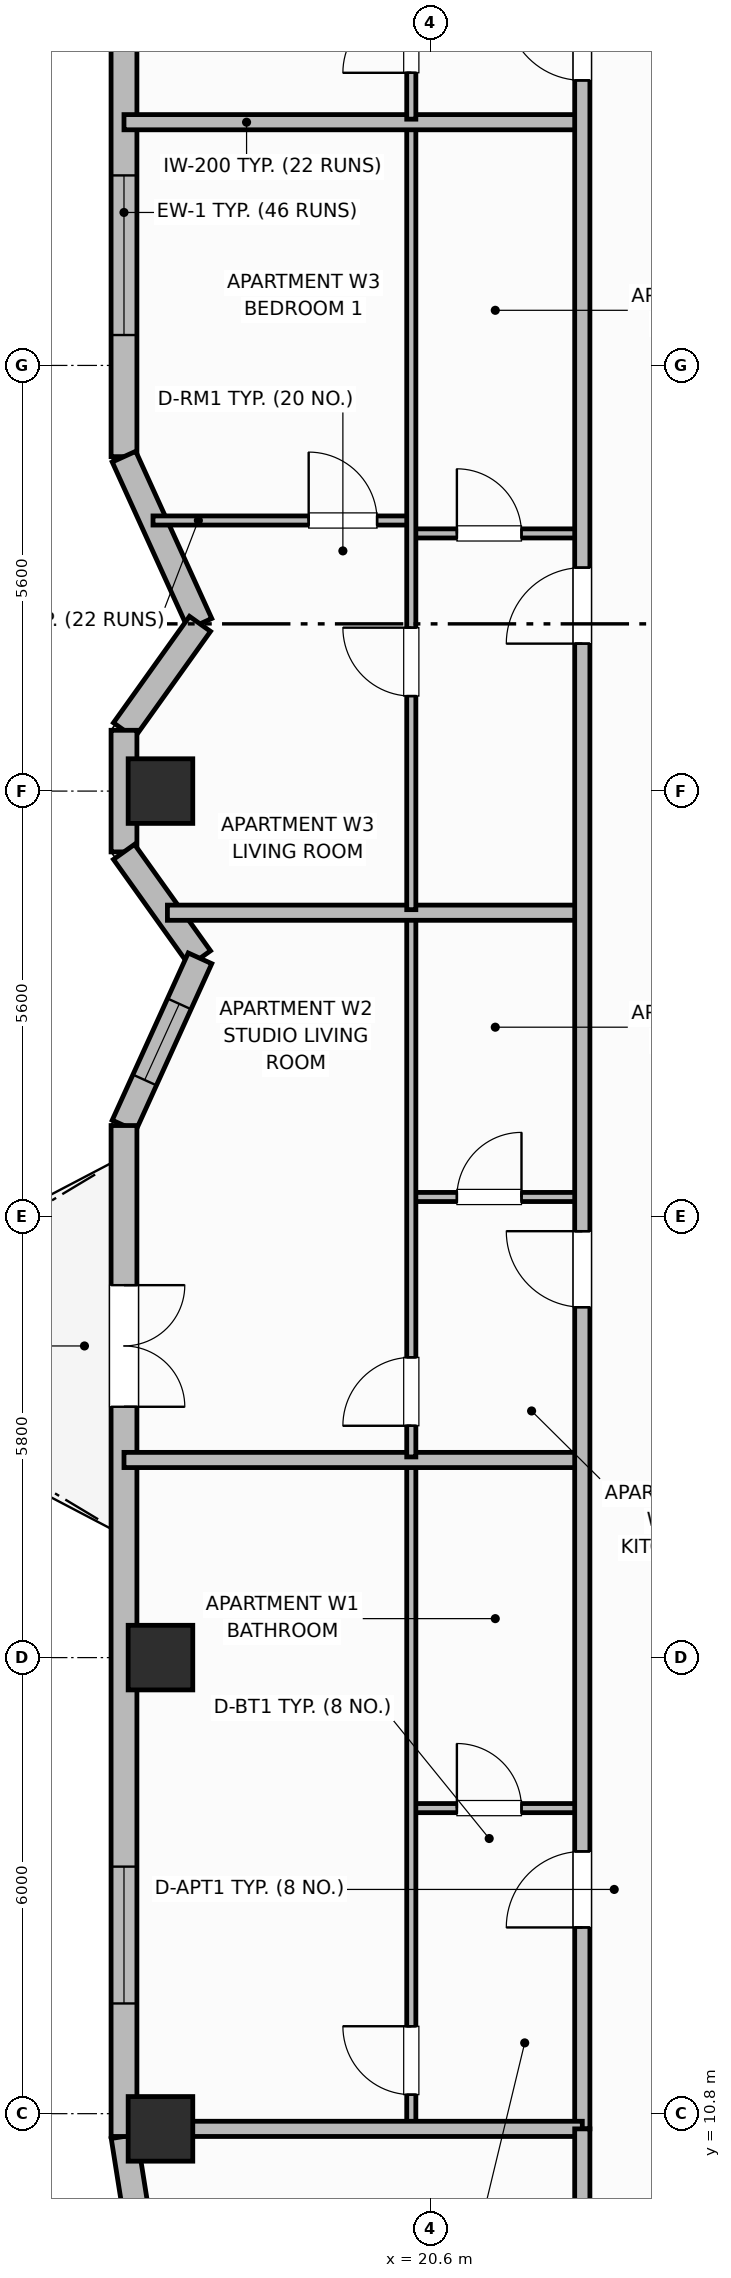
"""IFC4 building model, lengths in metres.
Left out: names, types, materials, properties, quantities, classifications, styles, units other than length and angle.
Written with IfcOpenShell. Run it as: python <this file> out.ifc"""

import sys

from ifc_helpers import new_model, si_unit, direction, frame, frame_2d, origin, origin_2d, place, context, subcontext, project, spatial, rectangle, extrude, element, fill, save


model = new_model("IFC4")
c1 = context("Model", 3, precision=1e-05, world=origin(), true_north=direction((0.0, 1.0)))
c2 = subcontext(c1, "Body", "Model", "MODEL_VIEW")
j1 = project(units=[si_unit("LENGTHUNIT", "METRE"), si_unit("PLANEANGLEUNIT", "RADIAN")], contexts=[c1])
p1 = place(None, origin())
s1 = spatial("IfcSite", under=j1, at=p1, CompositionType="ELEMENT")
p2 = place(p1, origin())
s2 = spatial("IfcBuilding", under=s1, at=p2, CompositionType="ELEMENT")
p3 = place(p2, frame((0.0, 0.0, 222.1)))
s3 = spatial("IfcBuildingStorey", under=s2, at=p3, CompositionType="ELEMENT", Elevation=222.1)
for number, where, z_axis, x_axis in (
    (1, (17.05, 10.6, 0.0), (0.0, 0.0, 1.0), (1.0, 0.0, 0.0)),
    (2, (17.05, 16.8, 0.0), (0.0, 0.0, 1.0), (1.0, 0.0, 0.0)),
    (3, (17.05, 28.2, 0.0), (0.0, 0.0, 1.0), (1.0, 0.0, 0.0)),
):
    element("IfcColumn", number, at=place(p3, frame(where, z_axis=z_axis, x_axis=x_axis)), inside=s3, PredefinedType="COLUMN", context=c2, shape_type="SweptSolid", body=[
        extrude(rectangle(XDim=0.85, YDim=0.85, at=origin_2d()), origin(), (0.0, 0.0, 1.0), 3.7),
    ])
p4 = place(p3, frame((16.57, 10.5, 0.0), z_axis=(0.0, 0.0, 1.0), x_axis=(0.156514556949, -0.987675651954, 0.0)))
e4 = element("IfcWall", 4, at=p4, inside=s3, PredefinedType="SOLIDWALL", context=c2, shape_type="SweptSolid", body=[
    extrude(rectangle(XDim=1.135, YDim=0.34, at=frame_2d((0.568, 0.0))), origin(), (0.0, 0.0, 1.0), 2.26),
])
p5 = place(p3, frame((16.57, 45.9, 0.0), z_axis=(0.0, 0.0, 1.0), x_axis=(0.0, -1.0, 0.0)))
e5 = element("IfcWall", 5, at=p5, inside=s3, PredefinedType="SOLIDWALL", context=c2, shape_type="SweptSolid", body=[
    extrude(rectangle(XDim=13.3, YDim=0.34, at=frame_2d((6.65, 0.0))), origin(), (0.0, 0.0, 1.0), 2.26),
])
p6 = place(p5, frame((1.6, 0.0, 0.3)))
e6 = element("IfcOpeningElement", 6, at=p6, cuts=e5, PredefinedType="OPENING", context=c2, shape_type="SweptSolid", body=[
    extrude(rectangle(XDim=2.1, YDim=1.9, at=frame_2d((1.05, 0.95))), frame((0.0, 0.18, 0.0), z_axis=(0.0, -1.0, 0.0), x_axis=(1.0, 0.0, 0.0)), (0.0, 0.0, 1.0), 0.36),
])
p7 = place(p5, frame((9.6, 0.0, 0.3)))
e7 = element("IfcOpeningElement", 7, at=p7, cuts=e5, PredefinedType="OPENING", context=c2, shape_type="SweptSolid", body=[
    extrude(rectangle(XDim=2.1, YDim=1.9, at=frame_2d((1.05, 0.95))), frame((0.0, 0.18, 0.0), z_axis=(0.0, -1.0, 0.0), x_axis=(1.0, 0.0, 0.0)), (0.0, 0.0, 1.0), 0.36),
])
p8 = place(p3, frame((16.57, 32.6, 0.0), z_axis=(0.0, 0.0, 1.0), x_axis=(0.413772500085, -0.910380315128, 0.0)))
e8 = element("IfcWall", 8, at=p8, inside=s3, PredefinedType="SOLIDWALL", context=c2, shape_type="SweptSolid", body=[
    extrude(rectangle(XDim=2.417, YDim=0.34, at=frame_2d((1.208, 0.0))), origin(), (0.0, 0.0, 1.0), 2.26),
])
p9 = place(p3, frame((17.57, 30.4, 0.0), z_axis=(0.0, 0.0, 1.0), x_axis=(-0.581265041318, -0.813714293681, 0.0)))
e9 = element("IfcWall", 9, at=p9, inside=s3, PredefinedType="SOLIDWALL", context=c2, shape_type="SweptSolid", body=[
    extrude(rectangle(XDim=1.72, YDim=0.34, at=frame_2d((0.86, 0.0))), origin(), (0.0, 0.0, 1.0), 2.26),
])
p10 = place(p3, frame((16.57, 29.0, 0.0), z_axis=(0.0, 0.0, 1.0), x_axis=(0.0, -1.0, 0.0)))
e10 = element("IfcWall", 10, at=p10, inside=s3, PredefinedType="SOLIDWALL", context=c2, shape_type="SweptSolid", body=[
    extrude(rectangle(XDim=1.6, YDim=0.34, at=frame_2d((0.8, 0.0))), origin(), (0.0, 0.0, 1.0), 2.26),
])
p11 = place(p3, frame((16.57, 27.4, 0.0), z_axis=(0.0, 0.0, 1.0), x_axis=(0.581265041318, -0.813714293681, 0.0)))
e11 = element("IfcWall", 11, at=p11, inside=s3, PredefinedType="SOLIDWALL", context=c2, shape_type="SweptSolid", body=[
    extrude(rectangle(XDim=1.72, YDim=0.34, at=frame_2d((0.86, 0.0))), origin(), (0.0, 0.0, 1.0), 2.26),
])
p12 = place(p3, frame((17.57, 26.0, 0.0), z_axis=(0.0, 0.0, 1.0), x_axis=(-0.413810555983, -0.910363017569, 0.0)))
e12 = element("IfcWall", 12, at=p12, inside=s3, PredefinedType="SOLIDWALL", context=c2, shape_type="SweptSolid", body=[
    extrude(rectangle(XDim=2.417, YDim=0.34, at=frame_2d((1.208, 0.0))), origin(), (0.0, 0.0, 1.0), 2.26),
])
p13 = place(p12, frame((0.658, 0.0, 0.45)))
e13 = element("IfcOpeningElement", 13, at=p13, cuts=e12, PredefinedType="OPENING", context=c2, shape_type="SweptSolid", body=[
    extrude(rectangle(XDim=1.1, YDim=1.65, at=frame_2d((0.55, 0.825))), frame((0.0, 0.18, 0.0), z_axis=(0.0, -1.0, 0.0), x_axis=(1.0, 0.0, 0.0)), (0.0, 0.0, 1.0), 0.36),
])
p14 = place(p3, frame((16.57, 23.8, 0.0), z_axis=(0.0, 0.0, 1.0), x_axis=(0.0, -1.0, 0.0)))
e14 = element("IfcWall", 14, at=p14, inside=s3, PredefinedType="SOLIDWALL", context=c2, shape_type="SweptSolid", body=[
    extrude(rectangle(XDim=13.3, YDim=0.34, at=frame_2d((6.65, 0.0))), origin(), (0.0, 0.0, 1.0), 2.26),
])
p15 = place(p14, frame((2.1, 0.0, 0.0)))
e15 = element("IfcOpeningElement", 15, at=p15, cuts=e14, PredefinedType="OPENING", context=c2, shape_type="SweptSolid", body=[
    extrude(rectangle(XDim=1.6, YDim=2.1, at=frame_2d((0.8, 1.05))), frame((0.0, 0.18, 0.0), z_axis=(0.0, -1.0, 0.0), x_axis=(1.0, 0.0, 0.0)), (0.0, 0.0, 1.0), 0.36),
])
p16 = place(p14, frame((9.75, 0.0, 0.3)))
e16 = element("IfcOpeningElement", 16, at=p16, cuts=e14, PredefinedType="OPENING", context=c2, shape_type="SweptSolid", body=[
    extrude(rectangle(XDim=1.8, YDim=1.85, at=frame_2d((0.9, 0.925))), frame((0.0, 0.18, 0.0), z_axis=(0.0, -1.0, 0.0), x_axis=(1.0, 0.0, 0.0)), (0.0, 0.0, 1.0), 0.36),
])
p17 = place(p3, frame((20.35, 14.82, 0.0), z_axis=(0.0, 0.0, 1.0), x_axis=(1.0, 0.0, 0.0)))
e17 = element("IfcWall", 17, at=p17, inside=s3, PredefinedType="PARTITIONING", context=c2, shape_type="SweptSolid", body=[
    extrude(rectangle(XDim=2.25, YDim=0.12, at=frame_2d((1.125, 0.0))), origin(), (0.0, 0.0, 1.0), 2.24),
])
p18 = place(p17, frame((0.6, 0.0, 0.0)))
e18 = element("IfcOpeningElement", 18, at=p18, cuts=e17, PredefinedType="OPENING", context=c2, shape_type="SweptSolid", body=[
    extrude(rectangle(XDim=0.85, YDim=2.1, at=frame_2d((0.425, 1.05))), frame((0.0, 0.07, 0.0), z_axis=(0.0, -1.0, 0.0), x_axis=(1.0, 0.0, 0.0)), (0.0, 0.0, 1.0), 0.14),
])
p19 = place(p3, frame((20.35, 10.64, 0.0), z_axis=(0.0, 0.0, 1.0), x_axis=(0.0, 1.0, 0.0)))
e19 = element("IfcWall", 19, at=p19, inside=s3, PredefinedType="PARTITIONING", context=c2, shape_type="SweptSolid", body=[
    extrude(rectangle(XDim=8.72, YDim=0.12, at=frame_2d((4.36, 0.0))), origin(), (0.0, 0.0, 1.0), 2.24),
])
p20 = place(p19, frame((0.41, 0.0, 0.0)))
e20 = element("IfcOpeningElement", 20, at=p20, cuts=e19, PredefinedType="OPENING", context=c2, shape_type="SweptSolid", body=[
    extrude(rectangle(XDim=0.9, YDim=2.1, at=frame_2d((0.45, 1.05))), frame((0.0, 0.07, 0.0), z_axis=(0.0, -1.0, 0.0), x_axis=(1.0, 0.0, 0.0)), (0.0, 0.0, 1.0), 0.14),
])
p21 = place(p3, frame((16.57, 19.4, 0.0), z_axis=(0.0, 0.0, 1.0), x_axis=(1.0, 0.0, 0.0)))
e21 = element("IfcWall", 21, at=p21, inside=s3, PredefinedType="PARTITIONING", context=c2, shape_type="SweptSolid", body=[
    extrude(rectangle(XDim=6.03, YDim=0.2, at=frame_2d((3.015, 0.0))), origin(), (0.0, 0.0, 1.0), 2.24),
])
p22 = place(p3, frame((20.35, 22.86, 0.0), z_axis=(0.0, 0.0, 1.0), x_axis=(1.0, 0.0, 0.0)))
e22 = element("IfcWall", 22, at=p22, inside=s3, PredefinedType="PARTITIONING", context=c2, shape_type="SweptSolid", body=[
    extrude(rectangle(XDim=2.25, YDim=0.12, at=frame_2d((1.125, 0.0))), origin(), (0.0, 0.0, 1.0), 2.24),
])
p23 = place(p22, frame((0.6, 0.0, 0.0)))
e23 = element("IfcOpeningElement", 23, at=p23, cuts=e22, PredefinedType="OPENING", context=c2, shape_type="SweptSolid", body=[
    extrude(rectangle(XDim=0.85, YDim=2.1, at=frame_2d((0.425, 1.05))), frame((0.0, 0.07, 0.0), z_axis=(0.0, -1.0, 0.0), x_axis=(1.0, 0.0, 0.0)), (0.0, 0.0, 1.0), 0.14),
])
p24 = place(p3, frame((20.35, 19.44, 0.0), z_axis=(0.0, 0.0, 1.0), x_axis=(0.0, 1.0, 0.0)))
e24 = element("IfcWall", 24, at=p24, inside=s3, PredefinedType="PARTITIONING", context=c2, shape_type="SweptSolid", body=[
    extrude(rectangle(XDim=7.12, YDim=0.12, at=frame_2d((3.56, 0.0))), origin(), (0.0, 0.0, 1.0), 2.24),
])
p25 = place(p24, frame((0.41, 0.0, 0.0)))
e25 = element("IfcOpeningElement", 25, at=p25, cuts=e24, PredefinedType="OPENING", context=c2, shape_type="SweptSolid", body=[
    extrude(rectangle(XDim=0.9, YDim=2.1, at=frame_2d((0.45, 1.05))), frame((0.0, 0.07, 0.0), z_axis=(0.0, -1.0, 0.0), x_axis=(1.0, 0.0, 0.0)), (0.0, 0.0, 1.0), 0.14),
])
p26 = place(p3, frame((17.141, 26.6, 0.0), z_axis=(0.0, 0.0, 1.0), x_axis=(1.0, 0.0, 0.0)))
e26 = element("IfcWall", 26, at=p26, inside=s3, PredefinedType="PARTITIONING", context=c2, shape_type="SweptSolid", body=[
    extrude(rectangle(XDim=5.459, YDim=0.2, at=frame_2d((2.729, 0.0))), origin(), (0.0, 0.0, 1.0), 2.24),
])
p27 = place(p3, frame((20.35, 31.59, 0.0), z_axis=(0.0, 0.0, 1.0), x_axis=(1.0, 0.0, 0.0)))
e27 = element("IfcWall", 27, at=p27, inside=s3, PredefinedType="PARTITIONING", context=c2, shape_type="SweptSolid", body=[
    extrude(rectangle(XDim=2.25, YDim=0.12, at=frame_2d((1.125, 0.0))), origin(), (0.0, 0.0, 1.0), 2.24),
])
p28 = place(p27, frame((0.6, 0.0, 0.0)))
e28 = element("IfcOpeningElement", 28, at=p28, cuts=e27, PredefinedType="OPENING", context=c2, shape_type="SweptSolid", body=[
    extrude(rectangle(XDim=0.85, YDim=2.1, at=frame_2d((0.425, 1.05))), frame((0.0, 0.07, 0.0), z_axis=(0.0, -1.0, 0.0), x_axis=(1.0, 0.0, 0.0)), (0.0, 0.0, 1.0), 0.14),
])
p29 = place(p3, frame((16.952, 31.76, 0.0), z_axis=(0.0, 0.0, 1.0), x_axis=(1.0, 0.0, 0.0)))
e29 = element("IfcWall", 29, at=p29, inside=s3, PredefinedType="PARTITIONING", context=c2, shape_type="SweptSolid", body=[
    extrude(rectangle(XDim=3.398, YDim=0.12, at=frame_2d((1.699, 0.0))), origin(), (0.0, 0.0, 1.0), 2.24),
])
p30 = place(p29, frame((2.048, 0.0, 0.0)))
e30 = element("IfcOpeningElement", 30, at=p30, cuts=e29, PredefinedType="OPENING", context=c2, shape_type="SweptSolid", body=[
    extrude(rectangle(XDim=0.9, YDim=2.1, at=frame_2d((0.45, 1.05))), frame((0.0, 0.07, 0.0), z_axis=(0.0, -1.0, 0.0), x_axis=(1.0, 0.0, 0.0)), (0.0, 0.0, 1.0), 0.14),
])
p31 = place(p3, frame((20.35, 26.64, 0.0), z_axis=(0.0, 0.0, 1.0), x_axis=(0.0, 1.0, 0.0)))
e31 = element("IfcWall", 31, at=p31, inside=s3, PredefinedType="PARTITIONING", context=c2, shape_type="SweptSolid", body=[
    extrude(rectangle(XDim=10.32, YDim=0.12, at=frame_2d((5.16, 0.0))), origin(), (0.0, 0.0, 1.0), 2.24),
])
p32 = place(p31, frame((2.81, 0.0, 0.0)))
e32 = element("IfcOpeningElement", 32, at=p32, cuts=e31, PredefinedType="OPENING", context=c2, shape_type="SweptSolid", body=[
    extrude(rectangle(XDim=0.9, YDim=2.1, at=frame_2d((0.45, 1.05))), frame((0.0, 0.07, 0.0), z_axis=(0.0, -1.0, 0.0), x_axis=(1.0, 0.0, 0.0)), (0.0, 0.0, 1.0), 0.14),
])
p33 = place(p3, frame((16.57, 37.0, 0.0), z_axis=(0.0, 0.0, 1.0), x_axis=(1.0, 0.0, 0.0)))
e33 = element("IfcWall", 33, at=p33, inside=s3, PredefinedType="PARTITIONING", context=c2, shape_type="SweptSolid", body=[
    extrude(rectangle(XDim=6.03, YDim=0.2, at=frame_2d((3.015, 0.0))), origin(), (0.0, 0.0, 1.0), 2.24),
])
p34 = place(p3, frame((20.35, 37.04, 0.0), z_axis=(0.0, 0.0, 1.0), x_axis=(0.0, 1.0, 0.0)))
e34 = element("IfcWall", 34, at=p34, inside=s3, PredefinedType="PARTITIONING", context=c2, shape_type="SweptSolid", body=[
    extrude(rectangle(XDim=8.72, YDim=0.12, at=frame_2d((4.36, 0.0))), origin(), (0.0, 0.0, 1.0), 2.24),
])
p35 = place(p34, frame((0.61, 0.0, 0.0)))
e35 = element("IfcOpeningElement", 35, at=p35, cuts=e34, PredefinedType="OPENING", context=c2, shape_type="SweptSolid", body=[
    extrude(rectangle(XDim=0.9, YDim=2.1, at=frame_2d((0.45, 1.05))), frame((0.0, 0.07, 0.0), z_axis=(0.0, -1.0, 0.0), x_axis=(1.0, 0.0, 0.0)), (0.0, 0.0, 1.0), 0.14),
])
p36 = place(p3, frame((22.6, 10.6, 0.0), z_axis=(0.0, 0.0, 1.0), x_axis=(0.0, 1.0, 0.0)))
e36 = element("IfcWall", 36, at=p36, inside=s3, PredefinedType="PARTITIONING", context=c2, shape_type="SweptSolid", body=[
    extrude(rectangle(XDim=35.2, YDim=0.2, at=frame_2d((17.6, 0.0))), origin(), (0.0, 0.0, 1.0), 2.24),
])
p37 = place(p36, frame((2.65, 0.0, 0.0)))
e37 = element("IfcOpeningElement", 37, at=p37, cuts=e36, PredefinedType="OPENING", context=c2, shape_type="SweptSolid", body=[
    extrude(rectangle(XDim=1.0, YDim=2.15, at=frame_2d((0.5, 1.075))), frame((0.0, 0.11, 0.0), z_axis=(0.0, -1.0, 0.0), x_axis=(1.0, 0.0, 0.0)), (0.0, 0.0, 1.0), 0.22),
])
p38 = place(p36, frame((10.81, 0.0, 0.0)))
e38 = element("IfcOpeningElement", 38, at=p38, cuts=e36, PredefinedType="OPENING", context=c2, shape_type="SweptSolid", body=[
    extrude(rectangle(XDim=1.0, YDim=2.15, at=frame_2d((0.5, 1.075))), frame((0.0, 0.11, 0.0), z_axis=(0.0, -1.0, 0.0), x_axis=(1.0, 0.0, 0.0)), (0.0, 0.0, 1.0), 0.22),
])
p39 = place(p36, frame((19.54, 0.0, 0.0)))
e39 = element("IfcOpeningElement", 39, at=p39, cuts=e36, PredefinedType="OPENING", context=c2, shape_type="SweptSolid", body=[
    extrude(rectangle(XDim=1.0, YDim=2.15, at=frame_2d((0.5, 1.075))), frame((0.0, 0.11, 0.0), z_axis=(0.0, -1.0, 0.0), x_axis=(1.0, 0.0, 0.0)), (0.0, 0.0, 1.0), 0.22),
])
p40 = place(p36, frame((26.95, 0.0, 0.0)))
e40 = element("IfcOpeningElement", 40, at=p40, cuts=e36, PredefinedType="OPENING", context=c2, shape_type="SweptSolid", body=[
    extrude(rectangle(XDim=1.0, YDim=2.15, at=frame_2d((0.5, 1.075))), frame((0.0, 0.11, 0.0), z_axis=(0.0, -1.0, 0.0), x_axis=(1.0, 0.0, 0.0)), (0.0, 0.0, 1.0), 0.22),
])
p41 = place(p3, frame((16.99, 10.6, 0.0), z_axis=(0.0, 0.0, 1.0), x_axis=(1.0, 0.0, 0.0)))
e41 = element("IfcWall", 41, at=p41, inside=s3, PredefinedType="PARTITIONING", context=c2, shape_type="SweptSolid", body=[
    extrude(rectangle(XDim=5.61, YDim=0.2, at=frame_2d((2.805, 0.0))), origin(), (0.0, 0.0, 1.0), 2.24),
])
p42 = place(p3, frame((22.6, 6.87, 0.0), z_axis=(0.0, 0.0, 1.0), x_axis=(0.0, 1.0, 0.0)))
e42 = element("IfcWall", 42, at=p42, inside=s3, PredefinedType="PARTITIONING", context=c2, shape_type="SweptSolid", body=[
    extrude(rectangle(XDim=3.73, YDim=0.2, at=frame_2d((1.865, 0.0))), origin(), (0.0, 0.0, 1.0), 2.24),
])
p43 = place(p7, origin())
e43 = element("IfcWindow", 43, at=p43, inside=s3, PartitioningType="SINGLE_PANEL", PredefinedType="WINDOW", context=c2, shape_type="SweptSolid", body=[
    extrude(rectangle(XDim=2.1, YDim=1.9, at=frame_2d((1.05, 0.95))), frame((0.0, 0.03, 0.0), z_axis=(0.0, -1.0, 0.0), x_axis=(1.0, 0.0, 0.0)), (0.0, 0.0, 1.0), 0.06),
])
fill(e7, e43)
p44 = place(p13, origin())
e44 = element("IfcWindow", 44, at=p44, inside=s3, PartitioningType="SINGLE_PANEL", PredefinedType="WINDOW", context=c2, shape_type="SweptSolid", body=[
    extrude(rectangle(XDim=1.1, YDim=1.65, at=frame_2d((0.55, 0.825))), frame((0.0, 0.03, 0.0), z_axis=(0.0, -1.0, 0.0), x_axis=(1.0, 0.0, 0.0)), (0.0, 0.0, 1.0), 0.06),
])
fill(e13, e44)
p45 = place(p15, origin())
e45 = element("IfcDoor", 45, at=p45, inside=s3, OperationType="DOUBLE_DOOR_SINGLE_SWING", PredefinedType="DOOR", context=c2, shape_type="SweptSolid", body=[
    extrude(rectangle(XDim=1.6, YDim=2.1, at=frame_2d((0.8, 1.05))), frame((0.0, 0.025, 0.0), z_axis=(0.0, -1.0, 0.0), x_axis=(1.0, 0.0, 0.0)), (0.0, 0.0, 1.0), 0.05),
])
fill(e15, e45)
p46 = place(p16, origin())
e46 = element("IfcWindow", 46, at=p46, inside=s3, PartitioningType="SINGLE_PANEL", PredefinedType="WINDOW", context=c2, shape_type="SweptSolid", body=[
    extrude(rectangle(XDim=1.8, YDim=1.85, at=frame_2d((0.9, 0.925))), frame((0.0, 0.03, 0.0), z_axis=(0.0, -1.0, 0.0), x_axis=(1.0, 0.0, 0.0)), (0.0, 0.0, 1.0), 0.06),
])
fill(e16, e46)
p47 = place(p18, origin())
e47 = element("IfcDoor", 47, at=p47, inside=s3, OperationType="SINGLE_SWING_LEFT", PredefinedType="DOOR", context=c2, shape_type="SweptSolid", body=[
    extrude(rectangle(XDim=0.85, YDim=2.1, at=frame_2d((0.425, 1.05))), frame((0.0, 0.025, 0.0), z_axis=(0.0, -1.0, 0.0), x_axis=(1.0, 0.0, 0.0)), (0.0, 0.0, 1.0), 0.05),
])
fill(e18, e47)
p48 = place(p20, origin())
e48 = element("IfcDoor", 48, at=p48, inside=s3, OperationType="SINGLE_SWING_RIGHT", PredefinedType="DOOR", context=c2, shape_type="SweptSolid", body=[
    extrude(rectangle(XDim=0.9, YDim=2.1, at=frame_2d((0.45, 1.05))), frame((0.0, 0.025, 0.0), z_axis=(0.0, -1.0, 0.0), x_axis=(1.0, 0.0, 0.0)), (0.0, 0.0, 1.0), 0.05),
])
fill(e20, e48)
p49 = place(p23, origin())
e49 = element("IfcDoor", 49, at=p49, inside=s3, OperationType="SINGLE_SWING_RIGHT", PredefinedType="DOOR", context=c2, shape_type="SweptSolid", body=[
    extrude(rectangle(XDim=0.85, YDim=2.1, at=frame_2d((0.425, 1.05))), frame((0.0, 0.025, 0.0), z_axis=(0.0, -1.0, 0.0), x_axis=(1.0, 0.0, 0.0)), (0.0, 0.0, 1.0), 0.05),
])
fill(e23, e49)
p50 = place(p25, origin())
e50 = element("IfcDoor", 50, at=p50, inside=s3, OperationType="SINGLE_SWING_LEFT", PredefinedType="DOOR", context=c2, shape_type="SweptSolid", body=[
    extrude(rectangle(XDim=0.9, YDim=2.1, at=frame_2d((0.45, 1.05))), frame((0.0, 0.025, 0.0), z_axis=(0.0, -1.0, 0.0), x_axis=(1.0, 0.0, 0.0)), (0.0, 0.0, 1.0), 0.05),
])
fill(e25, e50)
p51 = place(p28, origin())
e51 = element("IfcDoor", 51, at=p51, inside=s3, OperationType="SINGLE_SWING_LEFT", PredefinedType="DOOR", context=c2, shape_type="SweptSolid", body=[
    extrude(rectangle(XDim=0.85, YDim=2.1, at=frame_2d((0.425, 1.05))), frame((0.0, 0.025, 0.0), z_axis=(0.0, -1.0, 0.0), x_axis=(1.0, 0.0, 0.0)), (0.0, 0.0, 1.0), 0.05),
])
fill(e28, e51)
p52 = place(p30, origin())
e52 = element("IfcDoor", 52, at=p52, inside=s3, OperationType="SINGLE_SWING_LEFT", PredefinedType="DOOR", context=c2, shape_type="SweptSolid", body=[
    extrude(rectangle(XDim=0.9, YDim=2.1, at=frame_2d((0.45, 1.05))), frame((0.0, 0.025, 0.0), z_axis=(0.0, -1.0, 0.0), x_axis=(1.0, 0.0, 0.0)), (0.0, 0.0, 1.0), 0.05),
])
fill(e30, e52)
p53 = place(p32, origin())
e53 = element("IfcDoor", 53, at=p53, inside=s3, OperationType="SINGLE_SWING_RIGHT", PredefinedType="DOOR", context=c2, shape_type="SweptSolid", body=[
    extrude(rectangle(XDim=0.9, YDim=2.1, at=frame_2d((0.45, 1.05))), frame((0.0, 0.025, 0.0), z_axis=(0.0, -1.0, 0.0), x_axis=(1.0, 0.0, 0.0)), (0.0, 0.0, 1.0), 0.05),
])
fill(e32, e53)
p54 = place(p35, origin())
e54 = element("IfcDoor", 54, at=p54, inside=s3, OperationType="SINGLE_SWING_LEFT", PredefinedType="DOOR", context=c2, shape_type="SweptSolid", body=[
    extrude(rectangle(XDim=0.9, YDim=2.1, at=frame_2d((0.45, 1.05))), frame((0.0, 0.025, 0.0), z_axis=(0.0, -1.0, 0.0), x_axis=(1.0, 0.0, 0.0)), (0.0, 0.0, 1.0), 0.05),
])
fill(e35, e54)
p55 = place(p37, origin())
e55 = element("IfcDoor", 55, at=p55, inside=s3, OperationType="SINGLE_SWING_LEFT", PredefinedType="DOOR", context=c2, shape_type="SweptSolid", body=[
    extrude(rectangle(XDim=1.0, YDim=2.15, at=frame_2d((0.5, 1.075))), frame((0.0, 0.025, 0.0), z_axis=(0.0, -1.0, 0.0), x_axis=(1.0, 0.0, 0.0)), (0.0, 0.0, 1.0), 0.05),
])
fill(e37, e55)
p56 = place(p38, origin())
e56 = element("IfcDoor", 56, at=p56, inside=s3, OperationType="SINGLE_SWING_RIGHT", PredefinedType="DOOR", context=c2, shape_type="SweptSolid", body=[
    extrude(rectangle(XDim=1.0, YDim=2.15, at=frame_2d((0.5, 1.075))), frame((0.0, 0.025, 0.0), z_axis=(0.0, -1.0, 0.0), x_axis=(1.0, 0.0, 0.0)), (0.0, 0.0, 1.0), 0.05),
])
fill(e38, e56)
p57 = place(p39, origin())
e57 = element("IfcDoor", 57, at=p57, inside=s3, OperationType="SINGLE_SWING_LEFT", PredefinedType="DOOR", context=c2, shape_type="SweptSolid", body=[
    extrude(rectangle(XDim=1.0, YDim=2.15, at=frame_2d((0.5, 1.075))), frame((0.0, 0.025, 0.0), z_axis=(0.0, -1.0, 0.0), x_axis=(1.0, 0.0, 0.0)), (0.0, 0.0, 1.0), 0.05),
])
fill(e39, e57)
p58 = place(p40, origin())
e58 = element("IfcDoor", 58, at=p58, inside=s3, OperationType="SINGLE_SWING_RIGHT", PredefinedType="DOOR", context=c2, shape_type="SweptSolid", body=[
    extrude(rectangle(XDim=1.0, YDim=2.15, at=frame_2d((0.5, 1.075))), frame((0.0, 0.025, 0.0), z_axis=(0.0, -1.0, 0.0), x_axis=(1.0, 0.0, 0.0)), (0.0, 0.0, 1.0), 0.05),
])
fill(e40, e58)
save(model, sys.argv[1])
